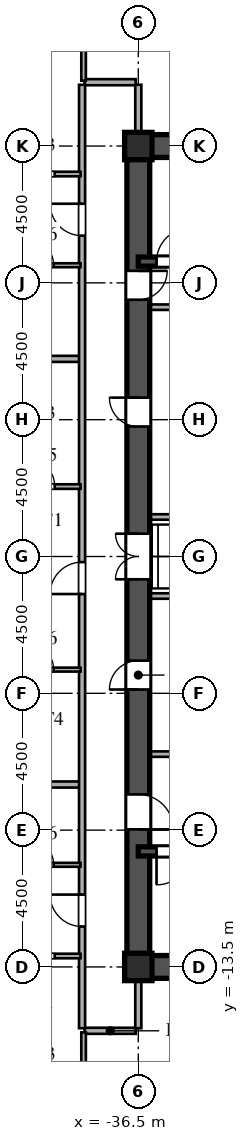
"""IFC4 building model, lengths in metres.
Left out: names, types, materials, properties, quantities, classifications, styles, units other than length and angle.
Written with IfcOpenShell. Run it as: python <this file> out.ifc"""

import sys

from ifc_helpers import new_model, si_unit, direction, frame, frame_2d, origin, origin_2d, place, context, subcontext, project, spatial, rectangle, i_section, extrude, source, transform, mapped, element, fill, save


model = new_model("IFC4")
c1 = context("Model", 3, precision=1e-05, world=origin(), true_north=direction((0.0, 1.0)))
c2 = subcontext(c1, "Body", "Model", "MODEL_VIEW")
j1 = project(units=[si_unit("LENGTHUNIT", "METRE"), si_unit("PLANEANGLEUNIT", "RADIAN")], contexts=[c1])
p1 = place(None, origin())
s1 = spatial("IfcSite", under=j1, at=p1, CompositionType="ELEMENT")
p2 = place(p1, origin())
s2 = spatial("IfcBuilding", under=s1, at=p2, CompositionType="ELEMENT")
p3 = place(p2, frame((0.0, 0.0, 18.9)))
s3 = spatial("IfcBuildingStorey", under=s2, at=p3, CompositionType="ELEMENT", Elevation=18.9)
m1 = source(origin(), c2, "Body", "SweptSolid", [
    extrude(i_section(OverallWidth=0.9, OverallDepth=0.9, WebThickness=0.036, FlangeThickness=0.055, at=origin_2d()), origin(), (0.0, 0.0, 1.0), 3.6),
])
for number, where, z_axis, x_axis in (
    (1, (-36.5, -13.5, 0.0), (0.0, 0.0, 1.0), (1.0, 0.0, 0.0)),
    (2, (-36.5, 13.5, 0.0), (0.0, 0.0, 1.0), (1.0, 0.0, 0.0)),
):
    element("IfcColumn", number, at=place(p3, frame(where, z_axis=z_axis, x_axis=x_axis)), inside=s3, PredefinedType="COLUMN", context=c2, shape_type="MappedRepresentation", body=[
        mapped(m1, transform((0.0, 0.0, 0.0), scale=1.0)),
    ])
for number, where, z_axis, x_axis in (
    (3, (-36.5, -13.5, 0.0), (0.0, 0.0, 1.0), (1.0, 0.0, 0.0)),
    (4, (-36.5, 13.5, 0.0), (0.0, 0.0, 1.0), (1.0, 0.0, 0.0)),
):
    element("IfcWall", number, at=place(p3, frame(where, z_axis=z_axis, x_axis=x_axis)), inside=s3, PredefinedType="SHEAR", context=c2, shape_type="SweptSolid", body=[
        extrude(rectangle(XDim=9.0, YDim=0.75, at=frame_2d((4.5, 0.0))), origin(), (0.0, 0.0, 1.0), 3.38),
    ])
p4 = place(p3, frame((-36.5, -13.65, 0.0), z_axis=(0.0, 0.0, 1.0), x_axis=(0.0, 1.0, 0.0)))
e5 = element("IfcWall", 5, at=p4, inside=s3, PredefinedType="SHEAR", context=c2, shape_type="SweptSolid", body=[
    extrude(rectangle(XDim=7.15, YDim=0.75, at=frame_2d((3.575, 0.0))), origin(), (0.0, 0.0, 1.0), 3.38),
])
p5 = place(p4, frame((4.675, 0.0, 0.0)))
e6 = element("IfcOpeningElement", 6, at=p5, cuts=e5, PredefinedType="OPENING", context=c2, shape_type="SweptSolid", body=[
    extrude(rectangle(XDim=1.15, YDim=2.2, at=frame_2d((0.575, 1.1))), frame((0.0, 0.385, 0.0), z_axis=(0.0, -1.0, 0.0), x_axis=(1.0, 0.0, 0.0)), (0.0, 0.0, 1.0), 0.77),
])
p6 = place(p3, frame((-36.5, -1.3, 0.0), z_axis=(0.0, 0.0, 1.0), x_axis=(0.0, 1.0, 0.0)))
e7 = element("IfcWall", 7, at=p6, inside=s3, PredefinedType="SHEAR", context=c2, shape_type="SweptSolid", body=[
    extrude(rectangle(XDim=2.6, YDim=0.75, at=frame_2d((1.3, 0.0))), origin(), (0.0, 0.0, 1.0), 3.38),
])
p7 = place(p6, frame((0.55, 0.0, 0.0)))
e8 = element("IfcOpeningElement", 8, at=p7, cuts=e7, PredefinedType="OPENING", context=c2, shape_type="SweptSolid", body=[
    extrude(rectangle(XDim=1.5, YDim=2.3, at=frame_2d((0.75, 1.15))), frame((0.0, 0.385, 0.0), z_axis=(0.0, -1.0, 0.0), x_axis=(1.0, 0.0, 0.0)), (0.0, 0.0, 1.0), 0.77),
])
p8 = place(p3, frame((-36.5, 8.2, 0.0), z_axis=(0.0, 0.0, 1.0), x_axis=(0.0, 1.0, 0.0)))
e9 = element("IfcWall", 9, at=p8, inside=s3, PredefinedType="SHEAR", context=c2, shape_type="SweptSolid", body=[
    extrude(rectangle(XDim=5.45, YDim=0.75, at=frame_2d((2.725, 0.0))), origin(), (0.0, 0.0, 1.0), 3.38),
])
p9 = place(p8, frame((0.245, 0.0, 0.0)))
e10 = element("IfcOpeningElement", 10, at=p9, cuts=e9, PredefinedType="OPENING", context=c2, shape_type="SweptSolid", body=[
    extrude(rectangle(XDim=0.95, YDim=2.15, at=frame_2d((0.475, 1.075))), frame((0.0, 0.385, 0.0), z_axis=(0.0, -1.0, 0.0), x_axis=(1.0, 0.0, 0.0)), (0.0, 0.0, 1.0), 0.77),
])
p10 = place(p3, frame((-36.5, -6.5, 0.0), z_axis=(0.0, 0.0, 1.0), x_axis=(0.0, 1.0, 0.0)))
e11 = element("IfcWall", 11, at=p10, inside=s3, PredefinedType="SHEAR", context=c2, shape_type="SweptSolid", body=[
    extrude(rectangle(XDim=5.2, YDim=0.75, at=frame_2d((2.6, 0.0))), origin(), (0.0, 0.0, 1.0), 3.38),
])
p11 = place(p10, frame((2.125, 0.0, 0.0)))
e12 = element("IfcOpeningElement", 12, at=p11, cuts=e11, PredefinedType="OPENING", context=c2, shape_type="SweptSolid", body=[
    extrude(rectangle(XDim=0.95, YDim=2.15, at=frame_2d((0.475, 1.075))), frame((0.0, 0.385, 0.0), z_axis=(0.0, -1.0, 0.0), x_axis=(1.0, 0.0, 0.0)), (0.0, 0.0, 1.0), 0.77),
])
p12 = place(p3, frame((-36.5, 1.3, 0.0), z_axis=(0.0, 0.0, 1.0), x_axis=(0.0, 1.0, 0.0)))
e13 = element("IfcWall", 13, at=p12, inside=s3, PredefinedType="SHEAR", context=c2, shape_type="SweptSolid", body=[
    extrude(rectangle(XDim=6.9, YDim=0.75, at=frame_2d((3.45, 0.0))), origin(), (0.0, 0.0, 1.0), 3.38),
])
p13 = place(p12, frame((2.975, 0.0, 0.0)))
e14 = element("IfcOpeningElement", 14, at=p13, cuts=e13, PredefinedType="OPENING", context=c2, shape_type="SweptSolid", body=[
    extrude(rectangle(XDim=0.95, YDim=2.15, at=frame_2d((0.475, 1.075))), frame((0.0, 0.385, 0.0), z_axis=(0.0, -1.0, 0.0), x_axis=(1.0, 0.0, 0.0)), (0.0, 0.0, 1.0), 0.77),
])
p14 = place(p3, frame((-36.5, -9.7, 0.0), z_axis=(0.0, 0.0, 1.0), x_axis=(1.0, 0.0, 0.0)))
e15 = element("IfcWall", 15, at=p14, inside=s3, PredefinedType="SHEAR", context=c2, shape_type="SweptSolid", body=[
    extrude(rectangle(XDim=9.0, YDim=0.3, at=frame_2d((4.5, 0.0))), origin(), (0.0, 0.0, 1.0), 3.38),
])
p15 = place(p14, frame((0.6, 0.0, 0.0)))
e16 = element("IfcOpeningElement", 16, at=p15, cuts=e15, PredefinedType="OPENING", context=c2, shape_type="SweptSolid", body=[
    extrude(rectangle(XDim=1.1, YDim=2.2, at=frame_2d((0.55, 1.1))), frame((0.0, 0.16, 0.0), z_axis=(0.0, -1.0, 0.0), x_axis=(1.0, 0.0, 0.0)), (0.0, 0.0, 1.0), 0.32),
])
p16 = place(p3, frame((-36.5, 9.7, 0.0), z_axis=(0.0, 0.0, 1.0), x_axis=(1.0, 0.0, 0.0)))
e17 = element("IfcWall", 17, at=p16, inside=s3, PredefinedType="SHEAR", context=c2, shape_type="SweptSolid", body=[
    extrude(rectangle(XDim=9.0, YDim=0.3, at=frame_2d((4.5, 0.0))), origin(), (0.0, 0.0, 1.0), 3.38),
])
p17 = place(p16, frame((0.6, 0.0, 0.0)))
e18 = element("IfcOpeningElement", 18, at=p17, cuts=e17, PredefinedType="OPENING", context=c2, shape_type="SweptSolid", body=[
    extrude(rectangle(XDim=1.1, YDim=2.2, at=frame_2d((0.55, 1.1))), frame((0.0, 0.16, 0.0), z_axis=(0.0, -1.0, 0.0), x_axis=(1.0, 0.0, 0.0)), (0.0, 0.0, 1.0), 0.32),
])
for number, where, z_axis, x_axis in (
    (19, (-36.15, -6.5, 0.0), (0.0, 0.0, 1.0), (1.0, 0.0, 0.0)),
    (20, (-36.15, 8.2, 0.0), (0.0, 0.0, 1.0), (1.0, 0.0, 0.0)),
):
    element("IfcWall", number, at=place(p3, frame(where, z_axis=z_axis, x_axis=x_axis)), inside=s3, PredefinedType="PARTITIONING", context=c2, shape_type="SweptSolid", body=[
        extrude(rectangle(XDim=5.7, YDim=0.18, at=frame_2d((2.85, 0.0))), origin(), (0.0, 0.0, 1.0), 3.38),
    ])
for number, where, z_axis, x_axis in (
    (21, (-36.15, -1.3, 0.0), (0.0, 0.0, 1.0), (1.0, 0.0, 0.0)),
    (22, (-36.15, 1.3, 0.0), (0.0, 0.0, 1.0), (1.0, 0.0, 0.0)),
):
    element("IfcWall", number, at=place(p3, frame(where, z_axis=z_axis, x_axis=x_axis)), inside=s3, PredefinedType="PARTITIONING", context=c2, shape_type="SweptSolid", body=[
        extrude(rectangle(XDim=2.95, YDim=0.18, at=frame_2d((1.475, 0.0))), origin(), (0.0, 0.0, 1.0), 3.38),
    ])
p18 = place(p3, frame((-38.265, -15.6, 0.0), z_axis=(0.0, 0.0, 1.0), x_axis=(1.0, 0.0, 0.0)))
e23 = element("IfcWall", 23, at=p18, inside=s3, PredefinedType="PARTITIONING", context=c2, shape_type="SweptSolid", body=[
    extrude(rectangle(XDim=1.68, YDim=0.2, at=frame_2d((0.84, 0.0))), origin(), (0.0, 0.0, 1.0), 3.38),
])
p19 = place(p3, frame((-41.05, -13.14, 0.0), z_axis=(0.0, 0.0, 1.0), x_axis=(1.0, 0.0, 0.0)))
e24 = element("IfcWall", 24, at=p19, inside=s3, PredefinedType="PARTITIONING", context=c2, shape_type="SweptSolid", body=[
    extrude(rectangle(XDim=2.65, YDim=0.15, at=frame_2d((1.325, 0.0))), origin(), (0.0, 0.0, 1.0), 3.38),
])
p20 = place(p19, frame((0.85, 0.0, 0.0)))
e25 = element("IfcOpeningElement", 25, at=p20, cuts=e24, PredefinedType="OPENING", context=c2, shape_type="SweptSolid", body=[
    extrude(rectangle(XDim=0.95, YDim=2.15, at=frame_2d((0.475, 1.075))), frame((0.0, 0.085, 0.0), z_axis=(0.0, -1.0, 0.0), x_axis=(1.0, 0.0, 0.0)), (0.0, 0.0, 1.0), 0.17),
])
p21 = place(p3, frame((-41.05, -10.14, 0.0), z_axis=(0.0, 0.0, 1.0), x_axis=(1.0, 0.0, 0.0)))
e26 = element("IfcWall", 26, at=p21, inside=s3, PredefinedType="PARTITIONING", context=c2, shape_type="SweptSolid", body=[
    extrude(rectangle(XDim=2.65, YDim=0.13, at=frame_2d((1.325, 0.0))), origin(), (0.0, 0.0, 1.0), 3.38),
])
p22 = place(p21, frame((0.885, 0.0, 0.0)))
e27 = element("IfcOpeningElement", 27, at=p22, cuts=e26, PredefinedType="OPENING", context=c2, shape_type="SweptSolid", body=[
    extrude(rectangle(XDim=0.88, YDim=2.1, at=frame_2d((0.44, 1.05))), frame((0.0, 0.075, 0.0), z_axis=(0.0, -1.0, 0.0), x_axis=(1.0, 0.0, 0.0)), (0.0, 0.0, 1.0), 0.15),
])
p23 = place(p3, frame((-72.505, -7.5, 0.0), z_axis=(0.0, 0.0, 1.0), x_axis=(1.0, 0.0, 0.0)))
e28 = element("IfcWall", 28, at=p23, inside=s3, PredefinedType="PARTITIONING", context=c2, shape_type="SweptSolid", body=[
    extrude(rectangle(XDim=34.075, YDim=0.2, at=frame_2d((17.038, 0.0))), origin(), (0.0, 0.0, 1.0), 3.38),
])
p24 = place(p3, frame((-41.05, -3.72, 0.0), z_axis=(0.0, 0.0, 1.0), x_axis=(1.0, 0.0, 0.0)))
e29 = element("IfcWall", 29, at=p24, inside=s3, PredefinedType="PARTITIONING", context=c2, shape_type="SweptSolid", body=[
    extrude(rectangle(XDim=2.65, YDim=0.13, at=frame_2d((1.325, 0.0))), origin(), (0.0, 0.0, 1.0), 3.38),
])
p25 = place(p24, frame((0.885, 0.0, 0.0)))
e30 = element("IfcOpeningElement", 30, at=p25, cuts=e29, PredefinedType="OPENING", context=c2, shape_type="SweptSolid", body=[
    extrude(rectangle(XDim=0.88, YDim=2.1, at=frame_2d((0.44, 1.05))), frame((0.0, 0.075, 0.0), z_axis=(0.0, -1.0, 0.0), x_axis=(1.0, 0.0, 0.0)), (0.0, 0.0, 1.0), 0.15),
])
p26 = place(p3, frame((-41.05, 2.3, 0.0), z_axis=(0.0, 0.0, 1.0), x_axis=(1.0, 0.0, 0.0)))
e31 = element("IfcWall", 31, at=p26, inside=s3, PredefinedType="PARTITIONING", context=c2, shape_type="SweptSolid", body=[
    extrude(rectangle(XDim=2.65, YDim=0.15, at=frame_2d((1.325, 0.0))), origin(), (0.0, 0.0, 1.0), 3.38),
])
p27 = place(p26, frame((0.85, 0.0, 0.0)))
e32 = element("IfcOpeningElement", 32, at=p27, cuts=e31, PredefinedType="OPENING", context=c2, shape_type="SweptSolid", body=[
    extrude(rectangle(XDim=0.95, YDim=2.15, at=frame_2d((0.475, 1.075))), frame((0.0, 0.085, 0.0), z_axis=(0.0, -1.0, 0.0), x_axis=(1.0, 0.0, 0.0)), (0.0, 0.0, 1.0), 0.17),
])
p28 = place(p3, frame((-72.505, 6.5, 0.0), z_axis=(0.0, 0.0, 1.0), x_axis=(1.0, 0.0, 0.0)))
e33 = element("IfcWall", 33, at=p28, inside=s3, PredefinedType="PARTITIONING", context=c2, shape_type="SweptSolid", body=[
    extrude(rectangle(XDim=34.075, YDim=0.2, at=frame_2d((17.038, 0.0))), origin(), (0.0, 0.0, 1.0), 3.38),
])
p29 = place(p3, frame((-41.05, 9.58, 0.0), z_axis=(0.0, 0.0, 1.0), x_axis=(1.0, 0.0, 0.0)))
e34 = element("IfcWall", 34, at=p29, inside=s3, PredefinedType="PARTITIONING", context=c2, shape_type="SweptSolid", body=[
    extrude(rectangle(XDim=2.65, YDim=0.13, at=frame_2d((1.325, 0.0))), origin(), (0.0, 0.0, 1.0), 3.38),
])
p30 = place(p29, frame((0.885, 0.0, 0.0)))
e35 = element("IfcOpeningElement", 35, at=p30, cuts=e34, PredefinedType="OPENING", context=c2, shape_type="SweptSolid", body=[
    extrude(rectangle(XDim=0.88, YDim=2.1, at=frame_2d((0.44, 1.05))), frame((0.0, 0.075, 0.0), z_axis=(0.0, -1.0, 0.0), x_axis=(1.0, 0.0, 0.0)), (0.0, 0.0, 1.0), 0.15),
])
p31 = place(p3, frame((-41.05, 12.58, 0.0), z_axis=(0.0, 0.0, 1.0), x_axis=(1.0, 0.0, 0.0)))
e36 = element("IfcWall", 36, at=p31, inside=s3, PredefinedType="PARTITIONING", context=c2, shape_type="SweptSolid", body=[
    extrude(rectangle(XDim=2.65, YDim=0.15, at=frame_2d((1.325, 0.0))), origin(), (0.0, 0.0, 1.0), 3.38),
])
p32 = place(p31, frame((0.85, 0.0, 0.0)))
e37 = element("IfcOpeningElement", 37, at=p32, cuts=e36, PredefinedType="OPENING", context=c2, shape_type="SweptSolid", body=[
    extrude(rectangle(XDim=0.95, YDim=2.15, at=frame_2d((0.475, 1.075))), frame((0.0, 0.085, 0.0), z_axis=(0.0, -1.0, 0.0), x_axis=(1.0, 0.0, 0.0)), (0.0, 0.0, 1.0), 0.17),
])
p33 = place(p3, frame((-38.265, 15.6, 0.0), z_axis=(0.0, 0.0, 1.0), x_axis=(1.0, 0.0, 0.0)))
e38 = element("IfcWall", 38, at=p33, inside=s3, PredefinedType="PARTITIONING", context=c2, shape_type="SweptSolid", body=[
    extrude(rectangle(XDim=1.68, YDim=0.2, at=frame_2d((0.84, 0.0))), origin(), (0.0, 0.0, 1.0), 3.38),
])
p34 = place(p3, frame((-38.35, -15.515, 0.0), z_axis=(0.0, 0.0, 1.0), x_axis=(0.0, 1.0, 0.0)))
e39 = element("IfcWall", 39, at=p34, inside=s3, PredefinedType="PARTITIONING", context=c2, shape_type="SweptSolid", body=[
    extrude(rectangle(XDim=31.03, YDim=0.2, at=frame_2d((15.515, 0.0))), origin(), (0.0, 0.0, 1.0), 3.38),
])
p35 = place(p34, frame((3.345, 0.0, 0.0)))
e40 = element("IfcOpeningElement", 40, at=p35, cuts=e39, PredefinedType="OPENING", context=c2, shape_type="SweptSolid", body=[
    extrude(rectangle(XDim=1.05, YDim=2.25, at=frame_2d((0.525, 1.125))), frame((0.0, 0.11, 0.0), z_axis=(0.0, -1.0, 0.0), x_axis=(1.0, 0.0, 0.0)), (0.0, 0.0, 1.0), 0.22),
])
p36 = place(p34, frame((14.28, 0.0, 0.0)))
e41 = element("IfcOpeningElement", 41, at=p36, cuts=e39, PredefinedType="OPENING", context=c2, shape_type="SweptSolid", body=[
    extrude(rectangle(XDim=1.05, YDim=2.25, at=frame_2d((0.525, 1.125))), frame((0.0, 0.11, 0.0), z_axis=(0.0, -1.0, 0.0), x_axis=(1.0, 0.0, 0.0)), (0.0, 0.0, 1.0), 0.22),
])
p37 = place(p34, frame((26.067, 0.0, 0.0)))
e42 = element("IfcOpeningElement", 42, at=p37, cuts=e39, PredefinedType="OPENING", context=c2, shape_type="SweptSolid", body=[
    extrude(rectangle(XDim=1.05, YDim=2.25, at=frame_2d((0.525, 1.125))), frame((0.0, 0.11, 0.0), z_axis=(0.0, -1.0, 0.0), x_axis=(1.0, 0.0, 0.0)), (0.0, 0.0, 1.0), 0.22),
])
p38 = place(p3, frame((-38.3, -23.878, 0.0), z_axis=(0.0, 0.0, 1.0), x_axis=(0.0, 1.0, 0.0)))
e43 = element("IfcWall", 43, at=p38, inside=s3, PredefinedType="PARTITIONING", context=c2, shape_type="SweptSolid", body=[
    extrude(rectangle(XDim=8.228, YDim=0.15, at=frame_2d((4.114, 0.0))), origin(), (0.0, 0.0, 1.0), 3.38),
])
p39 = place(p38, frame((1.357, 0.0, 0.0)))
e44 = element("IfcOpeningElement", 44, at=p39, cuts=e43, PredefinedType="OPENING", context=c2, shape_type="SweptSolid", body=[
    extrude(rectangle(XDim=0.95, YDim=2.15, at=frame_2d((0.475, 1.075))), frame((0.0, 0.085, 0.0), z_axis=(0.0, -1.0, 0.0), x_axis=(1.0, 0.0, 0.0)), (0.0, 0.0, 1.0), 0.17),
])
p40 = place(p3, frame((-38.3, 15.65, 0.0), z_axis=(0.0, 0.0, 1.0), x_axis=(0.0, 1.0, 0.0)))
e45 = element("IfcWall", 45, at=p40, inside=s3, PredefinedType="PARTITIONING", context=c2, shape_type="SweptSolid", body=[
    extrude(rectangle(XDim=8.228, YDim=0.15, at=frame_2d((4.114, 0.0))), origin(), (0.0, 0.0, 1.0), 3.38),
])
p41 = place(p40, frame((1.8, 0.0, 0.0)))
e46 = element("IfcOpeningElement", 46, at=p41, cuts=e45, PredefinedType="OPENING", context=c2, shape_type="SweptSolid", body=[
    extrude(rectangle(XDim=0.95, YDim=2.15, at=frame_2d((0.475, 1.075))), frame((0.0, 0.085, 0.0), z_axis=(0.0, -1.0, 0.0), x_axis=(1.0, 0.0, 0.0)), (0.0, 0.0, 1.0), 0.17),
])
for number, where, z_axis, x_axis in (
    (47, (-36.5, -15.515, 0.0), (0.0, 0.0, 1.0), (0.0, 1.0, 0.0)),
    (48, (-36.5, 13.88, 0.0), (0.0, 0.0, 1.0), (0.0, 1.0, 0.0)),
):
    element("IfcWall", number, at=place(p3, frame(where, z_axis=z_axis, x_axis=x_axis)), inside=s3, PredefinedType="PARTITIONING", context=c2, shape_type="SweptSolid", body=[
        extrude(rectangle(XDim=1.635, YDim=0.2, at=frame_2d((0.817, 0.0))), origin(), (0.0, 0.0, 1.0), 2.68),
    ])
m2 = source(origin(), c2, "Body", "SweptSolid", [
    extrude(rectangle(XDim=1.15, YDim=2.2, at=frame_2d((0.575, 1.1))), frame((0.0, 0.025, 0.0), z_axis=(0.0, -1.0, 0.0), x_axis=(1.0, 0.0, 0.0)), (0.0, 0.0, 1.0), 0.05),
])
p42 = place(p5, frame((1.15, 0.0, 0.0), z_axis=(0.0, 0.0, 1.0), x_axis=(-1.0, 0.0, 0.0)))
e49 = element("IfcDoor", 49, at=p42, inside=s3, OperationType="SINGLE_SWING_LEFT", PredefinedType="DOOR", context=c2, shape_type="MappedRepresentation", body=[
    mapped(m2, transform((0.0, 0.0, 0.0), scale=1.0)),
])
fill(e6, e49)
m3 = source(origin(), c2, "Body", "SweptSolid", [
    extrude(rectangle(XDim=1.5, YDim=2.3, at=frame_2d((0.75, 1.15))), frame((0.0, 0.025, 0.0), z_axis=(0.0, -1.0, 0.0), x_axis=(1.0, 0.0, 0.0)), (0.0, 0.0, 1.0), 0.05),
])
p43 = place(p7, origin())
e50 = element("IfcDoor", 50, at=p43, inside=s3, OperationType="DOUBLE_SWING_LEFT", PredefinedType="DOOR", context=c2, shape_type="MappedRepresentation", body=[
    mapped(m3, transform((0.0, 0.0, 0.0), scale=1.0)),
])
fill(e8, e50)
m4 = source(origin(), c2, "Body", "SweptSolid", [
    extrude(rectangle(XDim=0.95, YDim=2.15, at=frame_2d((0.475, 1.075))), frame((0.0, 0.025, 0.0), z_axis=(0.0, -1.0, 0.0), x_axis=(1.0, 0.0, 0.0)), (0.0, 0.0, 1.0), 0.05),
])
p44 = place(p9, frame((0.95, 0.0, 0.0), z_axis=(0.0, 0.0, 1.0), x_axis=(-1.0, 0.0, 0.0)))
e51 = element("IfcDoor", 51, at=p44, inside=s3, OperationType="SINGLE_SWING_RIGHT", PredefinedType="DOOR", context=c2, shape_type="MappedRepresentation", body=[
    mapped(m4, transform((0.0, 0.0, 0.0), scale=1.0)),
])
fill(e10, e51)
p45 = place(p11, origin())
e52 = element("IfcDoor", 52, at=p45, inside=s3, OperationType="SINGLE_SWING_LEFT", PredefinedType="DOOR", context=c2, shape_type="MappedRepresentation", body=[
    mapped(m4, transform((0.0, 0.0, 0.0), scale=1.0)),
])
fill(e12, e52)
p46 = place(p13, origin())
e53 = element("IfcDoor", 53, at=p46, inside=s3, OperationType="SINGLE_SWING_RIGHT", PredefinedType="DOOR", context=c2, shape_type="MappedRepresentation", body=[
    mapped(m4, transform((0.0, 0.0, 0.0), scale=1.0)),
])
fill(e14, e53)
m5 = source(origin(), c2, "Body", "SweptSolid", [
    extrude(rectangle(XDim=1.1, YDim=2.2, at=frame_2d((0.55, 1.1))), frame((0.0, 0.025, 0.0), z_axis=(0.0, -1.0, 0.0), x_axis=(1.0, 0.0, 0.0)), (0.0, 0.0, 1.0), 0.05),
])
p47 = place(p15, frame((1.1, 0.0, 0.0), z_axis=(0.0, 0.0, 1.0), x_axis=(-1.0, 0.0, 0.0)))
e54 = element("IfcDoor", 54, at=p47, inside=s3, OperationType="SINGLE_SWING_LEFT", PredefinedType="DOOR", context=c2, shape_type="MappedRepresentation", body=[
    mapped(m5, transform((0.0, 0.0, 0.0), scale=1.0)),
])
fill(e16, e54)
p48 = place(p17, origin())
e55 = element("IfcDoor", 55, at=p48, inside=s3, OperationType="SINGLE_SWING_RIGHT", PredefinedType="DOOR", context=c2, shape_type="MappedRepresentation", body=[
    mapped(m5, transform((0.0, 0.0, 0.0), scale=1.0)),
])
fill(e18, e55)
m6 = source(origin(), c2, "Body", "SweptSolid", [
    extrude(rectangle(XDim=0.88, YDim=2.1, at=frame_2d((0.44, 1.05))), frame((0.0, 0.025, 0.0), z_axis=(0.0, -1.0, 0.0), x_axis=(1.0, 0.0, 0.0)), (0.0, 0.0, 1.0), 0.05),
])
p49 = place(p22, origin())
e56 = element("IfcDoor", 56, at=p49, inside=s3, OperationType="SINGLE_SWING_LEFT", PredefinedType="DOOR", context=c2, shape_type="MappedRepresentation", body=[
    mapped(m6, transform((0.0, 0.0, 0.0), scale=1.0)),
])
fill(e27, e56)
p50 = place(p25, origin())
e57 = element("IfcDoor", 57, at=p50, inside=s3, OperationType="SINGLE_SWING_LEFT", PredefinedType="DOOR", context=c2, shape_type="MappedRepresentation", body=[
    mapped(m6, transform((0.0, 0.0, 0.0), scale=1.0)),
])
fill(e30, e57)
m7 = source(origin(), c2, "Body", "SweptSolid", [
    extrude(rectangle(XDim=0.95, YDim=2.15, at=frame_2d((0.475, 1.075))), frame((0.0, 0.025, 0.0), z_axis=(0.0, -1.0, 0.0), x_axis=(1.0, 0.0, 0.0)), (0.0, 0.0, 1.0), 0.05),
])
p51 = place(p27, origin())
e58 = element("IfcDoor", 58, at=p51, inside=s3, OperationType="SINGLE_SWING_LEFT", PredefinedType="DOOR", context=c2, shape_type="MappedRepresentation", body=[
    mapped(m7, transform((0.0, 0.0, 0.0), scale=1.0)),
])
fill(e32, e58)
p52 = place(p30, origin())
e59 = element("IfcDoor", 59, at=p52, inside=s3, OperationType="SINGLE_SWING_LEFT", PredefinedType="DOOR", context=c2, shape_type="MappedRepresentation", body=[
    mapped(m6, transform((0.0, 0.0, 0.0), scale=1.0)),
])
fill(e35, e59)
m8 = source(origin(), c2, "Body", "SweptSolid", [
    extrude(rectangle(XDim=1.05, YDim=2.25, at=frame_2d((0.525, 1.125))), frame((0.0, 0.025, 0.0), z_axis=(0.0, -1.0, 0.0), x_axis=(1.0, 0.0, 0.0)), (0.0, 0.0, 1.0), 0.05),
])
p53 = place(p35, origin())
e60 = element("IfcDoor", 60, at=p53, inside=s3, OperationType="SINGLE_SWING_RIGHT", PredefinedType="DOOR", context=c2, shape_type="MappedRepresentation", body=[
    mapped(m8, transform((0.0, 0.0, 0.0), scale=1.0)),
])
fill(e40, e60)
p54 = place(p36, origin())
e61 = element("IfcDoor", 61, at=p54, inside=s3, OperationType="SINGLE_SWING_LEFT", PredefinedType="DOOR", context=c2, shape_type="MappedRepresentation", body=[
    mapped(m8, transform((0.0, 0.0, 0.0), scale=1.0)),
])
fill(e41, e61)
p55 = place(p37, origin())
e62 = element("IfcDoor", 62, at=p55, inside=s3, OperationType="SINGLE_SWING_RIGHT", PredefinedType="DOOR", context=c2, shape_type="MappedRepresentation", body=[
    mapped(m8, transform((0.0, 0.0, 0.0), scale=1.0)),
])
fill(e42, e62)
save(model, sys.argv[1])
